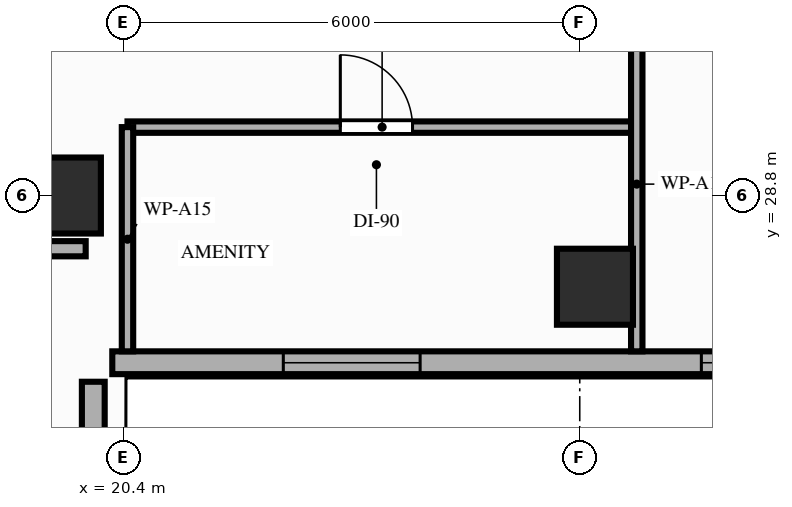
"""IFC4 building model, lengths in metres.
Left out: names, types, materials, properties, quantities, classifications, styles, units other than length and angle.
Written with IfcOpenShell. Run it as: python <this file> out.ifc"""

import sys

from ifc_helpers import new_model, si_unit, direction, frame, frame_2d, origin, origin_2d, place, context, subcontext, project, spatial, rectangle, extrude, element, fill, save


model = new_model("IFC4")
c1 = context("Model", 3, precision=1e-05, world=origin(), true_north=direction((0.0, 1.0)))
c2 = subcontext(c1, "Body", "Model", "MODEL_VIEW")
j1 = project(units=[si_unit("LENGTHUNIT", "METRE"), si_unit("PLANEANGLEUNIT", "RADIAN")], contexts=[c1])
p1 = place(None, origin())
s1 = spatial("IfcSite", under=j1, at=p1, CompositionType="ELEMENT")
p2 = place(p1, origin())
s2 = spatial("IfcBuilding", under=s1, at=p2, CompositionType="ELEMENT")
p3 = place(p2, frame((0.0, 0.0, 142.6)))
s3 = spatial("IfcBuildingStorey", under=s2, at=p3, CompositionType="ELEMENT", Elevation=142.6)
for number, where, z_axis, x_axis in (
    (1, (19.6, 28.8, 0.0), (0.0, 0.0, 1.0), (1.0, 0.0, 0.0)),
    (2, (26.6, 27.6, 0.0), (0.0, 0.0, 1.0), (1.0, 0.0, 0.0)),
):
    element("IfcColumn", number, at=place(p3, frame(where, z_axis=z_axis, x_axis=x_axis)), inside=s3, PredefinedType="COLUMN", context=c2, shape_type="SweptSolid", body=[
        extrude(rectangle(XDim=1.0, YDim=1.0, at=origin_2d()), origin(), (0.0, 0.0, 1.0), 3.2),
    ])
p4 = place(p3, frame((20.0, 8.8, 0.0), z_axis=(0.0, 0.0, 1.0), x_axis=(0.0, 1.0, 0.0)))
e3 = element("IfcWall", 3, at=p4, inside=s3, PredefinedType="STANDARD", context=c2, shape_type="SweptSolid", body=[
    extrude(rectangle(XDim=17.55, YDim=0.3, at=frame_2d((8.775, 0.0))), origin(), (0.0, 0.0, 1.0), 2.45),
])
p5 = place(p4, frame((10.64, 0.0, 0.85)))
e4 = element("IfcOpeningElement", 4, at=p5, cuts=e3, PredefinedType="OPENING", context=c2, shape_type="SweptSolid", body=[
    extrude(rectangle(XDim=1.8, YDim=1.35, at=frame_2d((0.9, 0.675))), frame((0.0, 0.16, 0.0), z_axis=(0.0, -1.0, 0.0), x_axis=(1.0, 0.0, 0.0)), (0.0, 0.0, 1.0), 0.32),
])
p6 = place(p4, frame((5.95, 0.0, 0.85)))
e5 = element("IfcOpeningElement", 5, at=p6, cuts=e3, PredefinedType="OPENING", context=c2, shape_type="SweptSolid", body=[
    extrude(rectangle(XDim=1.8, YDim=1.35, at=frame_2d((0.9, 0.675))), frame((0.0, 0.16, 0.0), z_axis=(0.0, -1.0, 0.0), x_axis=(1.0, 0.0, 0.0)), (0.0, 0.0, 1.0), 0.32),
])
p7 = place(p3, frame((20.25, 26.6, 0.0), z_axis=(0.0, 0.0, 1.0), x_axis=(1.0, 0.0, 0.0)))
e6 = element("IfcWall", 6, at=p7, inside=s3, PredefinedType="STANDARD", context=c2, shape_type="SweptSolid", body=[
    extrude(rectangle(XDim=26.15, YDim=0.3, at=frame_2d((13.075, 0.0))), origin(), (0.0, 0.0, 1.0), 2.71),
])
p8 = place(p7, frame((13.9, 0.0, 0.0)))
e7 = element("IfcOpeningElement", 7, at=p8, cuts=e6, PredefinedType="OPENING", context=c2, shape_type="SweptSolid", body=[
    extrude(rectangle(XDim=1.3, YDim=2.08, at=frame_2d((0.65, 1.04))), frame((0.0, 0.16, 0.0), z_axis=(0.0, -1.0, 0.0), x_axis=(1.0, 0.0, 0.0)), (0.0, 0.0, 1.0), 0.32),
])
p9 = place(p7, frame((2.25, 0.0, 0.85)))
e8 = element("IfcOpeningElement", 8, at=p9, cuts=e6, PredefinedType="OPENING", context=c2, shape_type="SweptSolid", body=[
    extrude(rectangle(XDim=1.8, YDim=1.61, at=frame_2d((0.9, 0.805))), frame((0.0, 0.16, 0.0), z_axis=(0.0, -1.0, 0.0), x_axis=(1.0, 0.0, 0.0)), (0.0, 0.0, 1.0), 0.32),
])
p10 = place(p7, frame((7.75, 0.0, 0.85)))
e9 = element("IfcOpeningElement", 9, at=p10, cuts=e6, PredefinedType="OPENING", context=c2, shape_type="SweptSolid", body=[
    extrude(rectangle(XDim=1.8, YDim=1.61, at=frame_2d((0.9, 0.805))), frame((0.0, 0.16, 0.0), z_axis=(0.0, -1.0, 0.0), x_axis=(1.0, 0.0, 0.0)), (0.0, 0.0, 1.0), 0.32),
])
p11 = place(p7, frame((22.25, 0.0, 0.85)))
e10 = element("IfcOpeningElement", 10, at=p11, cuts=e6, PredefinedType="OPENING", context=c2, shape_type="SweptSolid", body=[
    extrude(rectangle(XDim=1.8, YDim=1.61, at=frame_2d((0.9, 0.805))), frame((0.0, 0.16, 0.0), z_axis=(0.0, -1.0, 0.0), x_axis=(1.0, 0.0, 0.0)), (0.0, 0.0, 1.0), 0.32),
])
p12 = place(p3, frame((11.01, 28.1, 0.0), z_axis=(0.0, 0.0, 1.0), x_axis=(1.0, 0.0, 0.0)))
e11 = element("IfcWall", 11, at=p12, inside=s3, PredefinedType="PARTITIONING", context=c2, shape_type="SweptSolid", body=[
    extrude(rectangle(XDim=8.89, YDim=0.2, at=frame_2d((4.445, 0.0))), origin(), (0.0, 0.0, 1.0), 2.45),
])
p13 = place(p3, frame((20.45, 29.7, 0.0), z_axis=(0.0, 0.0, 1.0), x_axis=(1.0, 0.0, 0.0)))
e12 = element("IfcWall", 12, at=p13, inside=s3, PredefinedType="PARTITIONING", context=c2, shape_type="SweptSolid", body=[
    extrude(rectangle(XDim=6.7, YDim=0.15, at=frame_2d((3.35, 0.0))), origin(), (0.0, 0.0, 1.0), 3.02),
])
p14 = place(p13, frame((2.8, 0.0, 0.0)))
e13 = element("IfcOpeningElement", 13, at=p14, cuts=e12, PredefinedType="OPENING", context=c2, shape_type="SweptSolid", body=[
    extrude(rectangle(XDim=0.95, YDim=2.15, at=frame_2d((0.475, 1.075))), frame((0.0, 0.085, 0.0), z_axis=(0.0, -1.0, 0.0), x_axis=(1.0, 0.0, 0.0)), (0.0, 0.0, 1.0), 0.17),
])
p15 = place(p3, frame((20.45, 26.75, 0.0), z_axis=(0.0, 0.0, 1.0), x_axis=(0.0, 1.0, 0.0)))
e14 = element("IfcWall", 14, at=p15, inside=s3, PredefinedType="PARTITIONING", context=c2, shape_type="SweptSolid", body=[
    extrude(rectangle(XDim=2.95, YDim=0.15, at=frame_2d((1.475, 0.0))), origin(), (0.0, 0.0, 1.0), 2.45),
])
p16 = place(p3, frame((27.15, 26.75, 0.0), z_axis=(0.0, 0.0, 1.0), x_axis=(0.0, 1.0, 0.0)))
e15 = element("IfcWall", 15, at=p16, inside=s3, PredefinedType="PARTITIONING", context=c2, shape_type="SweptSolid", body=[
    extrude(rectangle(XDim=4.4, YDim=0.15, at=frame_2d((2.2, 0.0))), origin(), (0.0, 0.0, 1.0), 2.45),
])
p17 = place(p9, origin())
e16 = element("IfcWindow", 16, at=p17, inside=s3, PartitioningType="SINGLE_PANEL", PredefinedType="WINDOW", context=c2, shape_type="SweptSolid", body=[
    extrude(rectangle(XDim=1.8, YDim=1.61, at=frame_2d((0.9, 0.805))), frame((0.0, 0.03, 0.0), z_axis=(0.0, -1.0, 0.0), x_axis=(1.0, 0.0, 0.0)), (0.0, 0.0, 1.0), 0.06),
])
fill(e8, e16)
p18 = place(p10, origin())
e17 = element("IfcWindow", 17, at=p18, inside=s3, PartitioningType="SINGLE_PANEL", PredefinedType="WINDOW", context=c2, shape_type="SweptSolid", body=[
    extrude(rectangle(XDim=1.8, YDim=1.61, at=frame_2d((0.9, 0.805))), frame((0.0, 0.03, 0.0), z_axis=(0.0, -1.0, 0.0), x_axis=(1.0, 0.0, 0.0)), (0.0, 0.0, 1.0), 0.06),
])
fill(e9, e17)
p19 = place(p14, origin())
e18 = element("IfcDoor", 18, at=p19, inside=s3, OperationType="SINGLE_SWING_LEFT", PredefinedType="DOOR", context=c2, shape_type="SweptSolid", body=[
    extrude(rectangle(XDim=0.95, YDim=2.15, at=frame_2d((0.475, 1.075))), frame((0.0, 0.025, 0.0), z_axis=(0.0, -1.0, 0.0), x_axis=(1.0, 0.0, 0.0)), (0.0, 0.0, 1.0), 0.05),
])
fill(e13, e18)
save(model, sys.argv[1])
